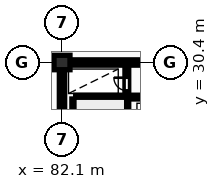
"""IFC4 building model, lengths in metres.
Left out: names, types, materials, properties, quantities, classifications, styles, units other than length and angle.
Written with IfcOpenShell. Run it as: python <this file> out.ifc"""

import sys

from ifc_helpers import new_model, si_unit, direction, frame, frame_2d, origin, origin_2d, place, context, subcontext, project, spatial, rectangle, extrude, element, fill, save


model = new_model("IFC4")
c1 = context("Model", 3, precision=1e-05, world=origin(), true_north=direction((0.0, 1.0)))
c2 = subcontext(c1, "Body", "Model", "MODEL_VIEW")
j1 = project(units=[si_unit("LENGTHUNIT", "METRE"), si_unit("PLANEANGLEUNIT", "RADIAN")], contexts=[c1])
p1 = place(None, origin())
s1 = spatial("IfcSite", under=j1, at=p1, CompositionType="ELEMENT")
p2 = place(p1, origin())
s2 = spatial("IfcBuilding", under=s1, at=p2, CompositionType="ELEMENT")
p3 = place(p2, origin())
s3 = spatial("IfcBuildingStorey", under=s2, at=p3, CompositionType="ELEMENT", Elevation=0.0)
p4 = place(p3, frame((82.1, 30.4, 0.0), z_axis=(0.0, 0.0, 1.0), x_axis=(1.0, 0.0, 0.0)))
e1 = element("IfcColumn", 1, at=p4, inside=s3, PredefinedType="COLUMN", context=c2, shape_type="SweptSolid", body=[
    extrude(rectangle(XDim=1.05, YDim=0.95, at=origin_2d()), origin(), (0.0, 0.0, 1.0), 5.4),
])
p5 = place(p3, frame((81.925, 30.4, 0.0), z_axis=(0.0, 0.0, 1.0), x_axis=(1.0, 0.0, 0.0)))
e2 = element("IfcWall", 2, at=p5, inside=s3, PredefinedType="SHEAR", context=c2, shape_type="SweptSolid", body=[
    extrude(rectangle(XDim=36.265, YDim=0.35, at=frame_2d((18.132, 0.0))), origin(), (0.0, 0.0, 1.0), 5.4),
])
p6 = place(p3, frame((82.1, 18.575, 0.0), z_axis=(0.0, 0.0, 1.0), x_axis=(0.0, 1.0, 0.0)))
e3 = element("IfcWall", 3, at=p6, inside=s3, PredefinedType="SHEAR", context=c2, shape_type="SweptSolid", body=[
    extrude(rectangle(XDim=11.65, YDim=0.35, at=frame_2d((5.825, 0.0))), origin(), (0.0, 0.0, 1.0), 5.4),
])
p7 = place(p3, frame((82.875, 20.4, 0.0), z_axis=(0.0, 0.0, 1.0), x_axis=(0.0, 1.0, 0.0)))
e4 = element("IfcWall", 4, at=p7, inside=s3, PredefinedType="SHEAR", context=c2, shape_type="SweptSolid", body=[
    extrude(rectangle(XDim=7.6, YDim=0.25, at=frame_2d((3.8, 0.0))), origin(), (0.0, 0.0, 1.0), 5.4),
])
p8 = place(p3, frame((86.365, 18.6, 0.0), z_axis=(0.0, 0.0, 1.0), x_axis=(0.0, 1.0, 0.0)))
e5 = element("IfcWall", 5, at=p8, inside=s3, PredefinedType="SHEAR", context=c2, shape_type="SweptSolid", body=[
    extrude(rectangle(XDim=11.6, YDim=0.25, at=frame_2d((5.8, 0.0))), origin(), (0.0, 0.0, 1.0), 5.4),
])
p9 = place(p8, frame((0.45, 0.0, 0.0)))
e6 = element("IfcOpeningElement", 6, at=p9, cuts=e5, PredefinedType="OPENING", context=c2, shape_type="SweptSolid", body=[
    extrude(rectangle(XDim=0.85, YDim=2.05, at=frame_2d((0.425, 1.025))), frame((0.0, 0.135, 0.0), z_axis=(0.0, -1.0, 0.0), x_axis=(1.0, 0.0, 0.0)), (0.0, 0.0, 1.0), 0.27),
])
p10 = place(p8, frame((2.05, 0.0, 0.0)))
e7 = element("IfcOpeningElement", 7, at=p10, cuts=e5, PredefinedType="OPENING", context=c2, shape_type="SweptSolid", body=[
    extrude(rectangle(XDim=1.1, YDim=2.1, at=frame_2d((0.55, 1.05))), frame((0.0, 0.135, 0.0), z_axis=(0.0, -1.0, 0.0), x_axis=(1.0, 0.0, 0.0)), (0.0, 0.0, 1.0), 0.27),
])
p11 = place(p8, frame((9.95, 0.0, 0.0)))
e8 = element("IfcOpeningElement", 8, at=p11, cuts=e5, PredefinedType="OPENING", context=c2, shape_type="SweptSolid", body=[
    extrude(rectangle(XDim=0.85, YDim=2.05, at=frame_2d((0.425, 1.025))), frame((0.0, 0.135, 0.0), z_axis=(0.0, -1.0, 0.0), x_axis=(1.0, 0.0, 0.0)), (0.0, 0.0, 1.0), 0.27),
])
p12 = place(p3, frame((83.0, 28.125, 0.0), z_axis=(0.0, 0.0, 1.0), x_axis=(1.0, 0.0, 0.0)))
e9 = element("IfcWall", 9, at=p12, inside=s3, PredefinedType="SHEAR", context=c2, shape_type="SweptSolid", body=[
    extrude(rectangle(XDim=7.82, YDim=0.25, at=frame_2d((3.91, 0.0))), origin(), (0.0, 0.0, 1.0), 5.4),
])
p13 = place(p11, origin())
e10 = element("IfcDoor", 10, at=p13, inside=s3, OperationType="SINGLE_SWING_RIGHT", PredefinedType="DOOR", context=c2, shape_type="SweptSolid", body=[
    extrude(rectangle(XDim=0.85, YDim=2.05, at=frame_2d((0.425, 1.025))), frame((0.0, 0.025, 0.0), z_axis=(0.0, -1.0, 0.0), x_axis=(1.0, 0.0, 0.0)), (0.0, 0.0, 1.0), 0.05),
])
fill(e8, e10)
save(model, sys.argv[1])
